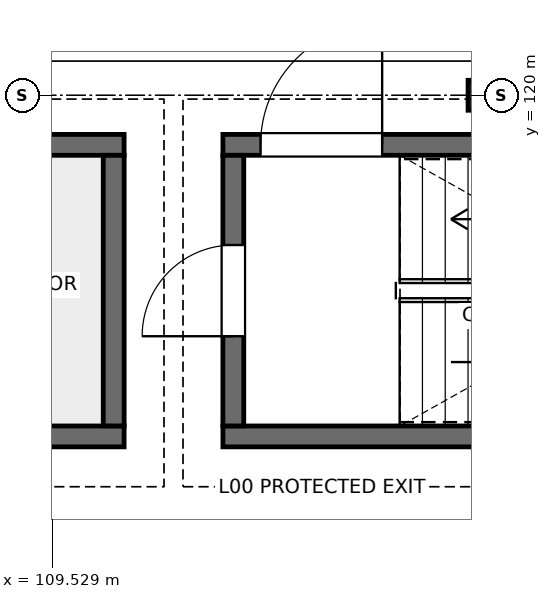
"""IFC4 building model, lengths in metres.
Left out: names, types, materials, properties, quantities, classifications, styles, units other than length and angle.
Written with IfcOpenShell. Run it as: python <this file> out.ifc"""

import sys

from ifc_helpers import new_model, si_unit, direction, frame, frame_2d, origin, origin_2d, place, context, subcontext, project, spatial, rectangle, i_section, extrude, element, fill, save


model = new_model("IFC4")
c1 = context("Model", 3, precision=1e-05, world=origin(), true_north=direction((0.0, 1.0)))
c2 = subcontext(c1, "Body", "Model", "MODEL_VIEW")
j1 = project(units=[si_unit("LENGTHUNIT", "METRE"), si_unit("PLANEANGLEUNIT", "RADIAN")], contexts=[c1])
p1 = place(None, origin())
s1 = spatial("IfcSite", under=j1, at=p1, CompositionType="ELEMENT")
p2 = place(p1, origin())
s2 = spatial("IfcBuilding", under=s1, at=p2, CompositionType="ELEMENT")
p3 = place(p2, origin())
s3 = spatial("IfcBuildingStorey", under=s2, at=p3, CompositionType="ELEMENT", Elevation=0.0)
p4 = place(p3, frame((115.2, 120.0, 0.0), z_axis=(0.0, 0.0, 1.0), x_axis=(1.0, 0.0, 0.0)))
e1 = element("IfcColumn", 1, at=p4, inside=s3, PredefinedType="COLUMN", context=c2, shape_type="SweptSolid", body=[
    extrude(i_section(OverallWidth=0.399, OverallDepth=0.394, WebThickness=0.023, FlangeThickness=0.037, FilletRadius=0.015, at=origin_2d()), origin(), (0.0, 0.0, 1.0), 5.4),
])
p5 = place(p3, frame((110.475, 115.512, 0.0), z_axis=(0.0, 0.0, 1.0), x_axis=(-1.0, 0.0, 0.0)))
e2 = element("IfcWall", 2, at=p5, inside=s3, PredefinedType="SOLIDWALL", context=c2, shape_type="SweptSolid", body=[
    extrude(rectangle(XDim=8.9, YDim=0.275, at=frame_2d((4.45, 0.0))), origin(), (0.0, 0.0, 1.0), 5.16),
])
p6 = place(p3, frame((101.575, 119.348, 0.0), z_axis=(0.0, 0.0, 1.0), x_axis=(1.0, 0.0, 0.0)))
e3 = element("IfcWall", 3, at=p6, inside=s3, PredefinedType="SOLIDWALL", context=c2, shape_type="SweptSolid", body=[
    extrude(rectangle(XDim=8.9, YDim=0.275, at=frame_2d((4.45, 0.0))), origin(), (0.0, 0.0, 1.0), 5.16),
])
p7 = place(p6, frame((0.495, 0.0, 0.0)))
e4 = element("IfcOpeningElement", 4, at=p7, cuts=e3, PredefinedType="OPENING", context=c2, shape_type="SweptSolid", body=[
    extrude(rectangle(XDim=1.6, YDim=2.15, at=frame_2d((0.8, 1.075))), frame((0.0, 0.147, 0.0), z_axis=(0.0, -1.0, 0.0), x_axis=(1.0, 0.0, 0.0)), (0.0, 0.0, 1.0), 0.295),
])
p8 = place(p3, frame((110.338, 119.21, 0.0), z_axis=(0.0, 0.0, 1.0), x_axis=(0.0, -1.0, 0.0)))
e5 = element("IfcWall", 5, at=p8, inside=s3, PredefinedType="SOLIDWALL", context=c2, shape_type="SweptSolid", body=[
    extrude(rectangle(XDim=3.56, YDim=0.275, at=frame_2d((1.78, 0.0))), origin(), (0.0, 0.0, 1.0), 5.16),
])
p9 = place(p3, frame((120.725, 115.512, 0.0), z_axis=(0.0, 0.0, 1.0), x_axis=(-1.0, 0.0, 0.0)))
e6 = element("IfcWall", 6, at=p9, inside=s3, PredefinedType="SOLIDWALL", context=c2, shape_type="SweptSolid", body=[
    extrude(rectangle(XDim=8.95, YDim=0.275, at=frame_2d((4.475, 0.0))), origin(), (0.0, 0.0, 1.0), 5.16),
])
p10 = place(p3, frame((111.775, 119.348, 0.0), z_axis=(0.0, 0.0, 1.0), x_axis=(1.0, 0.0, 0.0)))
e7 = element("IfcWall", 7, at=p10, inside=s3, PredefinedType="SOLIDWALL", context=c2, shape_type="SweptSolid", body=[
    extrude(rectangle(XDim=8.95, YDim=0.275, at=frame_2d((4.475, 0.0))), origin(), (0.0, 0.0, 1.0), 5.16),
])
p11 = place(p10, frame((0.495, 0.0, 0.0)))
e8 = element("IfcOpeningElement", 8, at=p11, cuts=e7, PredefinedType="OPENING", context=c2, shape_type="SweptSolid", body=[
    extrude(rectangle(XDim=1.6, YDim=2.15, at=frame_2d((0.8, 1.075))), frame((0.0, 0.147, 0.0), z_axis=(0.0, -1.0, 0.0), x_axis=(1.0, 0.0, 0.0)), (0.0, 0.0, 1.0), 0.295),
])
p12 = place(p3, frame((111.912, 115.65, 0.0), z_axis=(0.0, 0.0, 1.0), x_axis=(0.0, 1.0, 0.0)))
e9 = element("IfcWall", 9, at=p12, inside=s3, PredefinedType="SOLIDWALL", context=c2, shape_type="SweptSolid", body=[
    extrude(rectangle(XDim=3.56, YDim=0.275, at=frame_2d((1.78, 0.0))), origin(), (0.0, 0.0, 1.0), 5.16),
])
p13 = place(p12, frame((1.18, 0.0, 0.0)))
e10 = element("IfcOpeningElement", 10, at=p13, cuts=e9, PredefinedType="OPENING", context=c2, shape_type="SweptSolid", body=[
    extrude(rectangle(XDim=1.2, YDim=2.2, at=frame_2d((0.6, 1.1))), frame((0.0, 0.147, 0.0), z_axis=(0.0, -1.0, 0.0), x_axis=(1.0, 0.0, 0.0)), (0.0, 0.0, 1.0), 0.295),
])
p14 = place(p11, origin())
e11 = element("IfcDoor", 11, at=p14, inside=s3, OperationType="SINGLE_SWING_RIGHT", PredefinedType="DOOR", context=c2, shape_type="SweptSolid", body=[
    extrude(rectangle(XDim=1.6, YDim=2.15, at=frame_2d((0.8, 1.075))), frame((0.0, 0.025, 0.0), z_axis=(0.0, -1.0, 0.0), x_axis=(1.0, 0.0, 0.0)), (0.0, 0.0, 1.0), 0.05),
])
fill(e8, e11)
p15 = place(p13, origin())
e12 = element("IfcDoor", 12, at=p15, inside=s3, OperationType="SINGLE_SWING_LEFT", PredefinedType="DOOR", context=c2, shape_type="SweptSolid", body=[
    extrude(rectangle(XDim=1.2, YDim=2.2, at=frame_2d((0.6, 1.1))), frame((0.0, 0.025, 0.0), z_axis=(0.0, -1.0, 0.0), x_axis=(1.0, 0.0, 0.0)), (0.0, 0.0, 1.0), 0.05),
])
fill(e10, e12)
save(model, sys.argv[1])
